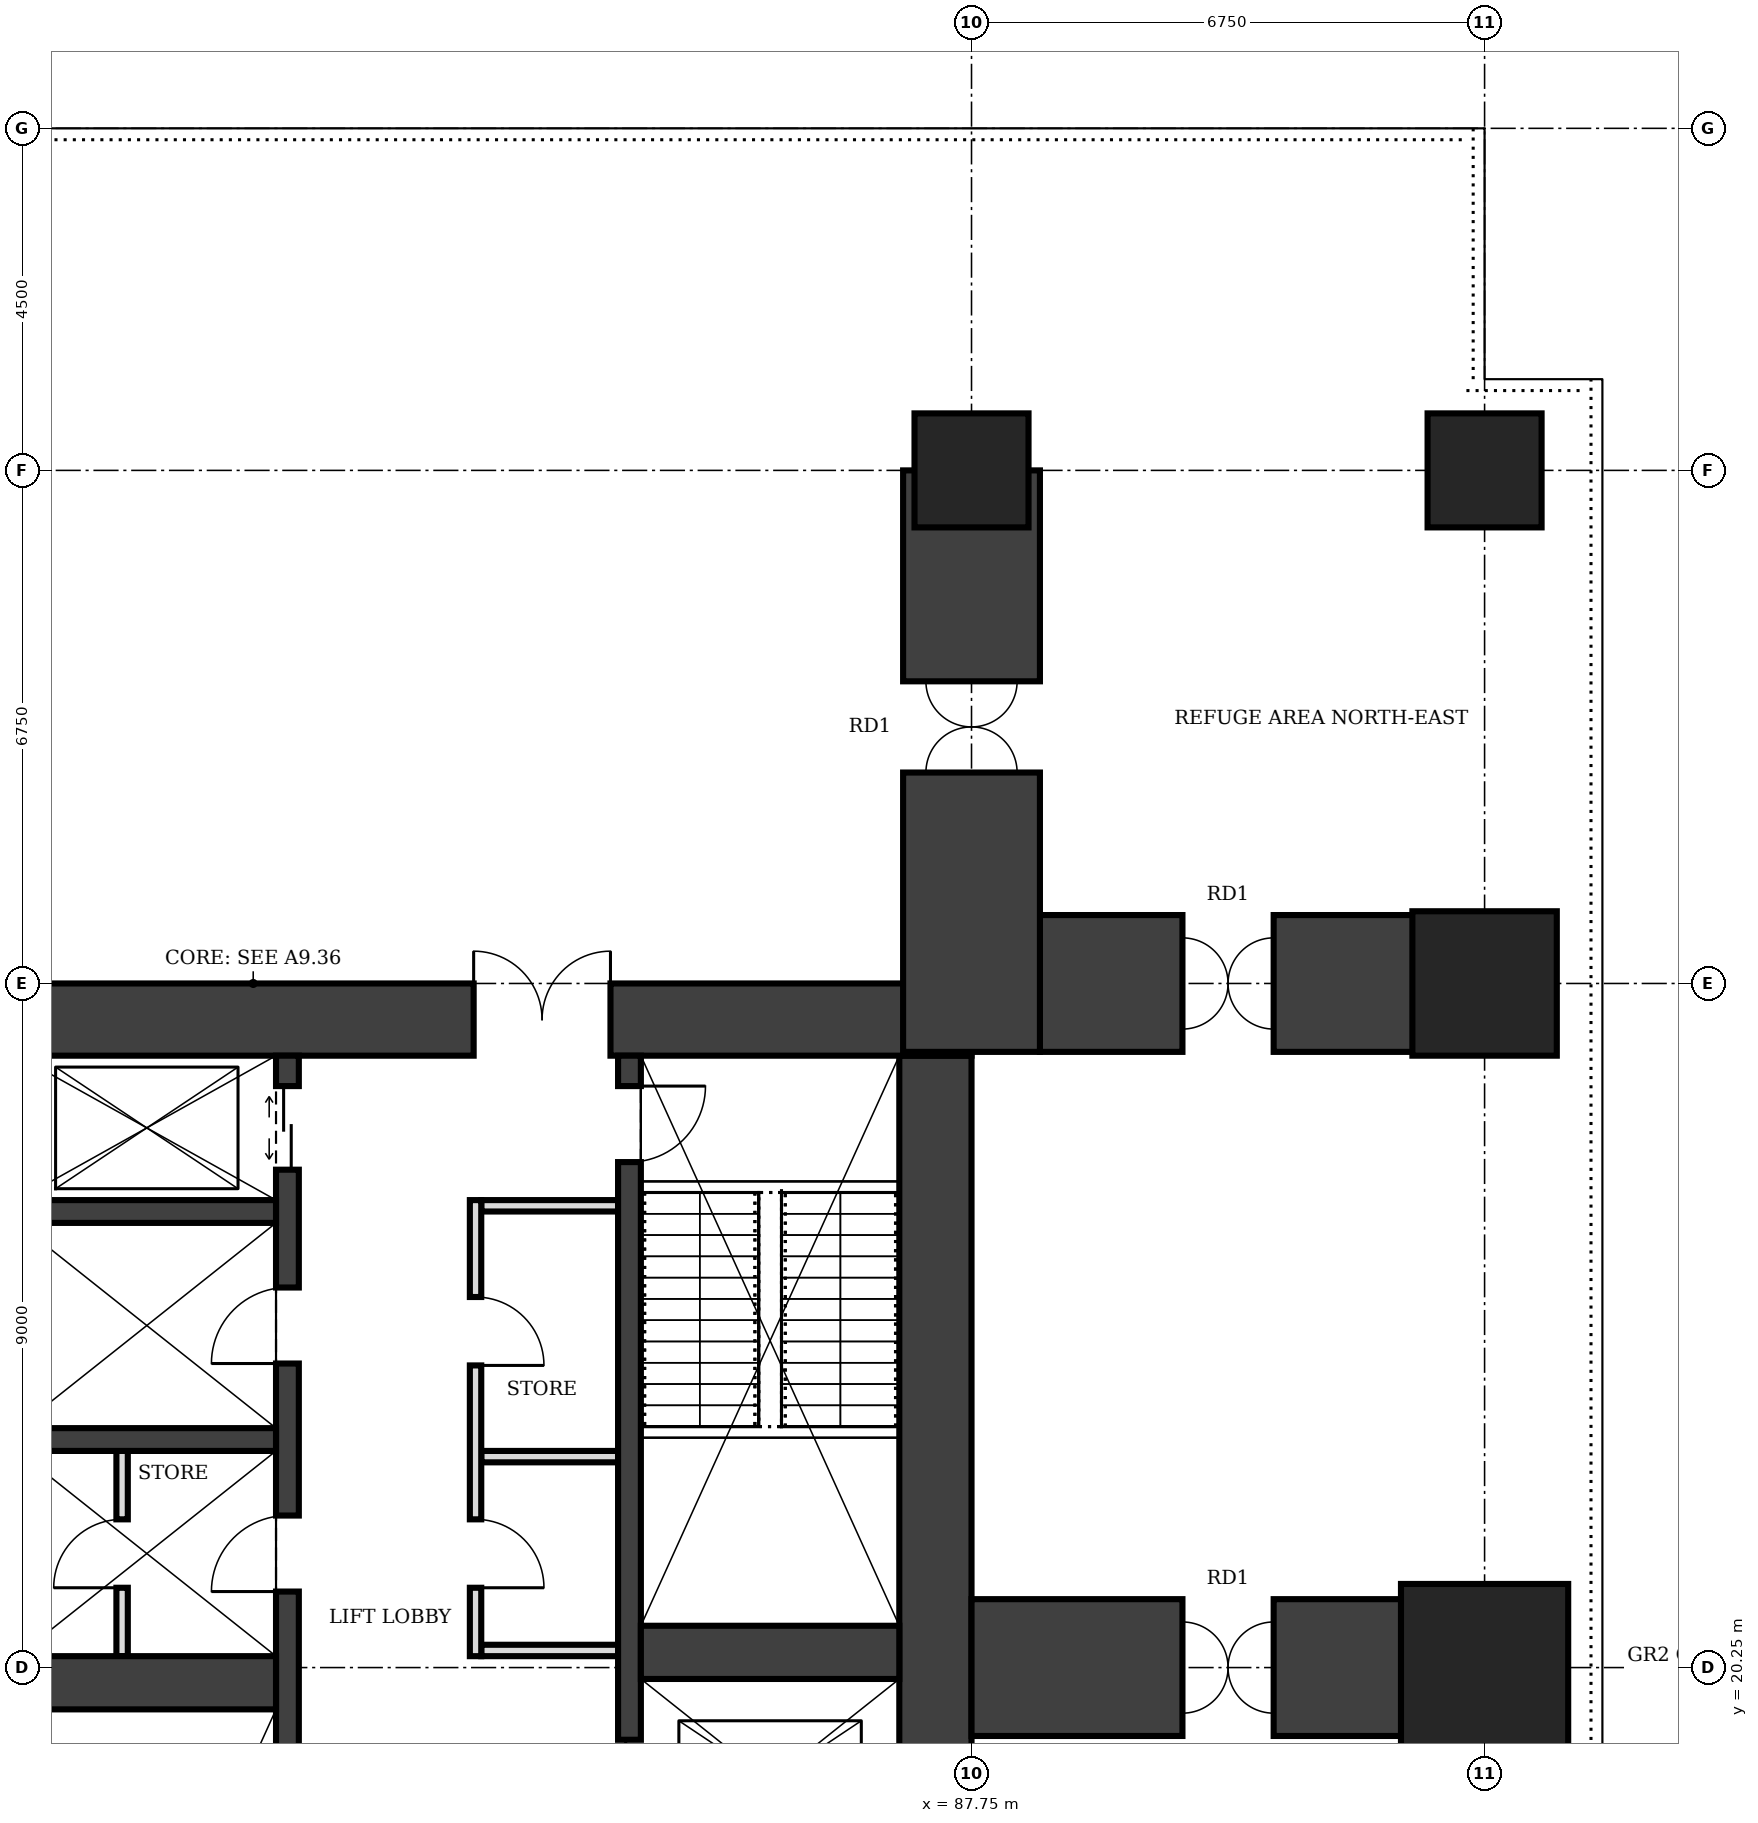
"""IFC4 building model, lengths in metres.
Left out: names, types, materials, properties, quantities, classifications, styles, units other than length and angle.
Written with IfcOpenShell. Run it as: python <this file> out.ifc"""

import sys

from ifc_helpers import new_model, si_unit, direction, frame, frame_2d, origin, origin_2d, place, context, subcontext, project, spatial, rectangle, extrude, element, fill, save


model = new_model("IFC4")
c1 = context("Model", 3, precision=1e-05, world=origin(), true_north=direction((0.0, 1.0)))
c2 = subcontext(c1, "Body", "Model", "MODEL_VIEW")
j1 = project(units=[si_unit("LENGTHUNIT", "METRE"), si_unit("PLANEANGLEUNIT", "RADIAN")], contexts=[c1])
p1 = place(None, origin())
s1 = spatial("IfcSite", under=j1, at=p1, CompositionType="ELEMENT")
p2 = place(p1, origin())
s2 = spatial("IfcBuilding", under=s1, at=p2, CompositionType="ELEMENT")
p3 = place(p2, frame((0.0, 0.0, 169.0)))
s3 = spatial("IfcBuildingStorey", under=s2, at=p3, CompositionType="ELEMENT", Elevation=169.0)
p4 = place(p3, frame((87.275, 12.2, 0.0), z_axis=(0.0, 0.0, 1.0), x_axis=(0.0, 1.0, 0.0)))
e1 = element("IfcWall", 1, at=p4, inside=s3, PredefinedType="SHEAR", context=c2, shape_type="SweptSolid", body=[
    extrude(rectangle(XDim=16.1, YDim=0.95, at=frame_2d((8.05, 0.0))), origin(), (0.0, 0.0, 1.0), 8.0),
])
p5 = place(p3, frame((87.75, 28.775, 0.0), z_axis=(0.0, 0.0, 1.0), x_axis=(-1.0, 0.0, 0.0)))
e2 = element("IfcWall", 2, at=p5, inside=s3, PredefinedType="SHEAR", context=c2, shape_type="SweptSolid", body=[
    extrude(rectangle(XDim=13.5, YDim=0.95, at=frame_2d((6.75, 0.0))), origin(), (0.0, 0.0, 1.0), 8.0),
])
p6 = place(p5, frame((4.75, 0.0, 0.0)))
e3 = element("IfcOpeningElement", 3, at=p6, cuts=e2, PredefinedType="OPENING", context=c2, shape_type="SweptSolid", body=[
    extrude(rectangle(XDim=1.8, YDim=2.1, at=frame_2d((0.9, 1.05))), frame((0.0, 0.485, 0.0), z_axis=(0.0, -1.0, 0.0), x_axis=(1.0, 0.0, 0.0)), (0.0, 0.0, 1.0), 0.97),
])
p7 = place(p3, frame((78.75, 12.2, 0.0), z_axis=(0.0, 0.0, 1.0), x_axis=(0.0, 1.0, 0.0)))
e4 = element("IfcWall", 4, at=p7, inside=s3, PredefinedType="SHEAR", context=c2, shape_type="SweptSolid", body=[
    extrude(rectangle(XDim=16.1, YDim=0.3, at=frame_2d((8.05, 0.0))), origin(), (0.0, 0.0, 1.0), 8.0),
])
p8 = place(p7, frame((0.4, 0.0, 0.0)))
e5 = element("IfcOpeningElement", 5, at=p8, cuts=e4, PredefinedType="OPENING", context=c2, shape_type="SweptSolid", body=[
    extrude(rectangle(XDim=1.0, YDim=2.1, at=frame_2d((0.5, 1.05))), frame((0.0, 0.16, 0.0), z_axis=(0.0, -1.0, 0.0), x_axis=(1.0, 0.0, 0.0)), (0.0, 0.0, 1.0), 0.32),
])
p9 = place(p7, frame((14.6, 0.0, 0.0)))
e6 = element("IfcOpeningElement", 6, at=p9, cuts=e4, PredefinedType="OPENING", context=c2, shape_type="SweptSolid", body=[
    extrude(rectangle(XDim=1.1, YDim=2.1, at=frame_2d((0.55, 1.05))), frame((0.0, 0.16, 0.0), z_axis=(0.0, -1.0, 0.0), x_axis=(1.0, 0.0, 0.0)), (0.0, 0.0, 1.0), 0.32),
])
p10 = place(p7, frame((9.05, 0.0, 0.0)))
e7 = element("IfcOpeningElement", 7, at=p10, cuts=e4, PredefinedType="OPENING", context=c2, shape_type="SweptSolid", body=[
    extrude(rectangle(XDim=1.0, YDim=2.1, at=frame_2d((0.5, 1.05))), frame((0.0, 0.16, 0.0), z_axis=(0.0, -1.0, 0.0), x_axis=(1.0, 0.0, 0.0)), (0.0, 0.0, 1.0), 0.32),
])
p11 = place(p7, frame((12.05, 0.0, 0.0)))
e8 = element("IfcOpeningElement", 8, at=p11, cuts=e4, PredefinedType="OPENING", context=c2, shape_type="SweptSolid", body=[
    extrude(rectangle(XDim=1.0, YDim=2.1, at=frame_2d((0.5, 1.05))), frame((0.0, 0.16, 0.0), z_axis=(0.0, -1.0, 0.0), x_axis=(1.0, 0.0, 0.0)), (0.0, 0.0, 1.0), 0.32),
])
p12 = place(p3, frame((83.25, 12.2, 0.0), z_axis=(0.0, 0.0, 1.0), x_axis=(0.0, 1.0, 0.0)))
e9 = element("IfcWall", 9, at=p12, inside=s3, PredefinedType="SHEAR", context=c2, shape_type="SweptSolid", body=[
    extrude(rectangle(XDim=16.1, YDim=0.3, at=frame_2d((8.05, 0.0))), origin(), (0.0, 0.0, 1.0), 8.0),
])
p13 = place(p12, frame((14.7, 0.0, 0.0)))
e10 = element("IfcOpeningElement", 10, at=p13, cuts=e9, PredefinedType="OPENING", context=c2, shape_type="SweptSolid", body=[
    extrude(rectangle(XDim=1.0, YDim=2.1, at=frame_2d((0.5, 1.05))), frame((0.0, 0.16, 0.0), z_axis=(0.0, -1.0, 0.0), x_axis=(1.0, 0.0, 0.0)), (0.0, 0.0, 1.0), 0.32),
])
p14 = place(p12, frame((0.4, 0.0, 0.0)))
e11 = element("IfcOpeningElement", 11, at=p14, cuts=e9, PredefinedType="OPENING", context=c2, shape_type="SweptSolid", body=[
    extrude(rectangle(XDim=1.1, YDim=2.1, at=frame_2d((0.55, 1.05))), frame((0.0, 0.16, 0.0), z_axis=(0.0, -1.0, 0.0), x_axis=(1.0, 0.0, 0.0)), (0.0, 0.0, 1.0), 0.32),
])
p15 = place(p12, frame((3.75, 0.0, 0.0)))
e12 = element("IfcOpeningElement", 12, at=p15, cuts=e9, PredefinedType="OPENING", context=c2, shape_type="SweptSolid", body=[
    extrude(rectangle(XDim=1.1, YDim=2.1, at=frame_2d((0.55, 1.05))), frame((0.0, 0.16, 0.0), z_axis=(0.0, -1.0, 0.0), x_axis=(1.0, 0.0, 0.0)), (0.0, 0.0, 1.0), 0.32),
])
p16 = place(p12, frame((6.0, 0.0, 0.0)))
e13 = element("IfcOpeningElement", 13, at=p16, cuts=e9, PredefinedType="OPENING", context=c2, shape_type="SweptSolid", body=[
    extrude(rectangle(XDim=1.1, YDim=2.1, at=frame_2d((0.55, 1.05))), frame((0.0, 0.16, 0.0), z_axis=(0.0, -1.0, 0.0), x_axis=(1.0, 0.0, 0.0)), (0.0, 0.0, 1.0), 0.32),
])
for number, where, z_axis, x_axis in (
    (14, (75.2, 20.05, 0.0), (0.0, 0.0, 1.0), (1.0, 0.0, 0.0)),
    (15, (83.4, 20.45, 0.0), (0.0, 0.0, 1.0), (1.0, 0.0, 0.0)),
):
    element("IfcWall", number, at=place(p3, frame(where, z_axis=z_axis, x_axis=x_axis)), inside=s3, PredefinedType="SHEAR", context=c2, shape_type="SweptSolid", body=[
        extrude(rectangle(XDim=3.4, YDim=0.7, at=frame_2d((1.7, 0.0))), origin(), (0.0, 0.0, 1.0), 8.0),
    ])
for number, where, z_axis, x_axis in (
    (16, (75.2, 23.25, 0.0), (0.0, 0.0, 1.0), (1.0, 0.0, 0.0)),
    (17, (75.2, 26.25, 0.0), (0.0, 0.0, 1.0), (1.0, 0.0, 0.0)),
):
    element("IfcWall", number, at=place(p3, frame(where, z_axis=z_axis, x_axis=x_axis)), inside=s3, PredefinedType="SHEAR", context=c2, shape_type="SweptSolid", body=[
        extrude(rectangle(XDim=3.4, YDim=0.3, at=frame_2d((1.7, 0.0))), origin(), (0.0, 0.0, 1.0), 8.0),
    ])
p17 = place(p3, frame((94.5, 20.25, 0.0), z_axis=(0.0, 0.0, 1.0), x_axis=(1.0, 0.0, 0.0)))
e18 = element("IfcColumn", 18, at=p17, inside=s3, PredefinedType="COLUMN", context=c2, shape_type="SweptSolid", body=[
    extrude(rectangle(XDim=2.2, YDim=2.2, at=origin_2d()), origin(), (0.0, 0.0, 1.0), 8.0),
])
p18 = place(p3, frame((94.5, 29.25, 0.0), z_axis=(0.0, 0.0, 1.0), x_axis=(1.0, 0.0, 0.0)))
e19 = element("IfcColumn", 19, at=p18, inside=s3, PredefinedType="COLUMN", context=c2, shape_type="SweptSolid", body=[
    extrude(rectangle(XDim=1.9, YDim=1.9, at=origin_2d()), origin(), (0.0, 0.0, 1.0), 8.0),
])
for number, where, z_axis, x_axis in (
    (20, (87.75, 36.0, 0.0), (0.0, 0.0, 1.0), (1.0, 0.0, 0.0)),
    (21, (94.5, 36.0, 0.0), (0.0, 0.0, 1.0), (1.0, 0.0, 0.0)),
):
    element("IfcColumn", number, at=place(p3, frame(where, z_axis=z_axis, x_axis=x_axis)), inside=s3, PredefinedType="COLUMN", context=c2, shape_type="SweptSolid", body=[
        extrude(rectangle(XDim=1.5, YDim=1.5, at=origin_2d()), origin(), (0.0, 0.0, 1.0), 8.0),
    ])
p19 = place(p3, frame((87.75, 28.35, 0.0), z_axis=(0.0, 0.0, 1.0), x_axis=(0.0, 1.0, 0.0)))
e22 = element("IfcWall", 22, at=p19, inside=s3, PredefinedType="SHEAR", context=c2, shape_type="SweptSolid", body=[
    extrude(rectangle(XDim=7.65, YDim=1.8, at=frame_2d((3.825, 0.0))), origin(), (0.0, 0.0, 1.0), 8.0),
])
p20 = place(p19, frame((3.675, 0.0, 0.0)))
e23 = element("IfcOpeningElement", 23, at=p20, cuts=e22, PredefinedType="OPENING", context=c2, shape_type="SweptSolid", body=[
    extrude(rectangle(XDim=1.2, YDim=2.1, at=frame_2d((0.6, 1.05))), frame((0.0, 0.91, 0.0), z_axis=(0.0, -1.0, 0.0), x_axis=(1.0, 0.0, 0.0)), (0.0, 0.0, 1.0), 1.82),
])
p21 = place(p3, frame((87.75, 20.25, 0.0), z_axis=(0.0, 0.0, 1.0), x_axis=(1.0, 0.0, 0.0)))
e24 = element("IfcWall", 24, at=p21, inside=s3, PredefinedType="SHEAR", context=c2, shape_type="SweptSolid", body=[
    extrude(rectangle(XDim=6.75, YDim=1.8, at=frame_2d((3.375, 0.0))), origin(), (0.0, 0.0, 1.0), 8.0),
])
p22 = place(p21, frame((2.775, 0.0, 0.0)))
e25 = element("IfcOpeningElement", 25, at=p22, cuts=e24, PredefinedType="OPENING", context=c2, shape_type="SweptSolid", body=[
    extrude(rectangle(XDim=1.2, YDim=2.1, at=frame_2d((0.6, 1.05))), frame((0.0, 0.91, 0.0), z_axis=(0.0, -1.0, 0.0), x_axis=(1.0, 0.0, 0.0)), (0.0, 0.0, 1.0), 1.82),
])
p23 = place(p3, frame((88.65, 29.25, 0.0), z_axis=(0.0, 0.0, 1.0), x_axis=(1.0, 0.0, 0.0)))
e26 = element("IfcWall", 26, at=p23, inside=s3, PredefinedType="SHEAR", context=c2, shape_type="SweptSolid", body=[
    extrude(rectangle(XDim=5.85, YDim=1.8, at=frame_2d((2.925, 0.0))), origin(), (0.0, 0.0, 1.0), 8.0),
])
p24 = place(p23, frame((1.875, 0.0, 0.0)))
e27 = element("IfcOpeningElement", 27, at=p24, cuts=e26, PredefinedType="OPENING", context=c2, shape_type="SweptSolid", body=[
    extrude(rectangle(XDim=1.2, YDim=2.1, at=frame_2d((0.6, 1.05))), frame((0.0, 0.91, 0.0), z_axis=(0.0, -1.0, 0.0), x_axis=(1.0, 0.0, 0.0)), (0.0, 0.0, 1.0), 1.82),
])
p25 = place(p3, frame((81.225, 20.4, 0.0), z_axis=(0.0, 0.0, 1.0), x_axis=(0.0, 1.0, 0.0)))
e28 = element("IfcWall", 28, at=p25, inside=s3, PredefinedType="PARTITIONING", context=c2, shape_type="SweptSolid", body=[
    extrude(rectangle(XDim=6.0, YDim=0.15, at=frame_2d((3.0, 0.0))), origin(), (0.0, 0.0, 1.0), 7.75),
])
p26 = place(p25, frame((0.9, 0.0, 0.0)))
e29 = element("IfcOpeningElement", 29, at=p26, cuts=e28, PredefinedType="OPENING", context=c2, shape_type="SweptSolid", body=[
    extrude(rectangle(XDim=0.9, YDim=2.1, at=frame_2d((0.45, 1.05))), frame((0.0, 0.085, 0.0), z_axis=(0.0, -1.0, 0.0), x_axis=(1.0, 0.0, 0.0)), (0.0, 0.0, 1.0), 0.17),
])
p27 = place(p25, frame((3.825, 0.0, 0.0)))
e30 = element("IfcOpeningElement", 30, at=p27, cuts=e28, PredefinedType="OPENING", context=c2, shape_type="SweptSolid", body=[
    extrude(rectangle(XDim=0.9, YDim=2.1, at=frame_2d((0.45, 1.05))), frame((0.0, 0.085, 0.0), z_axis=(0.0, -1.0, 0.0), x_axis=(1.0, 0.0, 0.0)), (0.0, 0.0, 1.0), 0.17),
])
for number, where, z_axis, x_axis in (
    (31, (81.3, 20.475, 0.0), (0.0, 0.0, 1.0), (1.0, 0.0, 0.0)),
    (32, (81.3, 23.025, 0.0), (0.0, 0.0, 1.0), (1.0, 0.0, 0.0)),
    (33, (81.3, 26.325, 0.0), (0.0, 0.0, 1.0), (1.0, 0.0, 0.0)),
):
    element("IfcWall", number, at=place(p3, frame(where, z_axis=z_axis, x_axis=x_axis)), inside=s3, PredefinedType="PARTITIONING", context=c2, shape_type="SweptSolid", body=[
        extrude(rectangle(XDim=1.8, YDim=0.15, at=frame_2d((0.9, 0.0))), origin(), (0.0, 0.0, 1.0), 7.75),
    ])
p28 = place(p3, frame((76.575, 20.4, 0.0), z_axis=(0.0, 0.0, 1.0), x_axis=(0.0, 1.0, 0.0)))
e34 = element("IfcWall", 34, at=p28, inside=s3, PredefinedType="PARTITIONING", context=c2, shape_type="SweptSolid", body=[
    extrude(rectangle(XDim=2.7, YDim=0.15, at=frame_2d((1.35, 0.0))), origin(), (0.0, 0.0, 1.0), 7.75),
])
p29 = place(p28, frame((0.9, 0.0, 0.0)))
e35 = element("IfcOpeningElement", 35, at=p29, cuts=e34, PredefinedType="OPENING", context=c2, shape_type="SweptSolid", body=[
    extrude(rectangle(XDim=0.9, YDim=2.1, at=frame_2d((0.45, 1.05))), frame((0.0, 0.085, 0.0), z_axis=(0.0, -1.0, 0.0), x_axis=(1.0, 0.0, 0.0)), (0.0, 0.0, 1.0), 0.17),
])
p30 = place(p6, frame((1.8, 0.0, 0.0), z_axis=(0.0, 0.0, 1.0), x_axis=(-1.0, 0.0, 0.0)))
e36 = element("IfcDoor", 36, at=p30, inside=s3, OperationType="DOUBLE_DOOR_SINGLE_SWING", PredefinedType="DOOR", context=c2, shape_type="SweptSolid", body=[
    extrude(rectangle(XDim=1.8, YDim=2.1, at=frame_2d((0.9, 1.05))), frame((0.0, 0.025, 0.0), z_axis=(0.0, -1.0, 0.0), x_axis=(1.0, 0.0, 0.0)), (0.0, 0.0, 1.0), 0.05),
])
fill(e3, e36)
p31 = place(p13, frame((1.0, 0.0, 0.0), z_axis=(0.0, 0.0, 1.0), x_axis=(-1.0, 0.0, 0.0)))
e37 = element("IfcDoor", 37, at=p31, inside=s3, OperationType="SINGLE_SWING_LEFT", PredefinedType="DOOR", context=c2, shape_type="SweptSolid", body=[
    extrude(rectangle(XDim=1.0, YDim=2.1, at=frame_2d((0.5, 1.05))), frame((0.0, 0.025, 0.0), z_axis=(0.0, -1.0, 0.0), x_axis=(1.0, 0.0, 0.0)), (0.0, 0.0, 1.0), 0.05),
])
fill(e10, e37)
p32 = place(p9, origin())
e38 = element("IfcDoor", 38, at=p32, inside=s3, OperationType="DOUBLE_DOOR_SLIDING", PredefinedType="DOOR", context=c2, shape_type="SweptSolid", body=[
    extrude(rectangle(XDim=1.1, YDim=2.1, at=frame_2d((0.55, 1.05))), frame((0.0, 0.025, 0.0), z_axis=(0.0, -1.0, 0.0), x_axis=(1.0, 0.0, 0.0)), (0.0, 0.0, 1.0), 0.05),
])
fill(e6, e38)
p33 = place(p16, origin())
e39 = element("IfcDoor", 39, at=p33, inside=s3, OperationType="DOUBLE_DOOR_SLIDING", PredefinedType="DOOR", context=c2, shape_type="SweptSolid", body=[
    extrude(rectangle(XDim=1.1, YDim=2.1, at=frame_2d((0.55, 1.05))), frame((0.0, 0.025, 0.0), z_axis=(0.0, -1.0, 0.0), x_axis=(1.0, 0.0, 0.0)), (0.0, 0.0, 1.0), 0.05),
])
fill(e13, e39)
p34 = place(p26, frame((0.9, 0.0, 0.0), z_axis=(0.0, 0.0, 1.0), x_axis=(-1.0, 0.0, 0.0)))
e40 = element("IfcDoor", 40, at=p34, inside=s3, OperationType="SINGLE_SWING_RIGHT", PredefinedType="DOOR", context=c2, shape_type="SweptSolid", body=[
    extrude(rectangle(XDim=0.9, YDim=2.1, at=frame_2d((0.45, 1.05))), frame((0.0, 0.025, 0.0), z_axis=(0.0, -1.0, 0.0), x_axis=(1.0, 0.0, 0.0)), (0.0, 0.0, 1.0), 0.05),
])
fill(e29, e40)
p35 = place(p27, frame((0.9, 0.0, 0.0), z_axis=(0.0, 0.0, 1.0), x_axis=(-1.0, 0.0, 0.0)))
e41 = element("IfcDoor", 41, at=p35, inside=s3, OperationType="SINGLE_SWING_RIGHT", PredefinedType="DOOR", context=c2, shape_type="SweptSolid", body=[
    extrude(rectangle(XDim=0.9, YDim=2.1, at=frame_2d((0.45, 1.05))), frame((0.0, 0.025, 0.0), z_axis=(0.0, -1.0, 0.0), x_axis=(1.0, 0.0, 0.0)), (0.0, 0.0, 1.0), 0.05),
])
fill(e30, e41)
p36 = place(p10, origin())
e42 = element("IfcDoor", 42, at=p36, inside=s3, OperationType="SINGLE_SWING_LEFT", PredefinedType="DOOR", context=c2, shape_type="SweptSolid", body=[
    extrude(rectangle(XDim=1.0, YDim=2.1, at=frame_2d((0.5, 1.05))), frame((0.0, 0.025, 0.0), z_axis=(0.0, -1.0, 0.0), x_axis=(1.0, 0.0, 0.0)), (0.0, 0.0, 1.0), 0.05),
])
fill(e7, e42)
p37 = place(p29, origin())
e43 = element("IfcDoor", 43, at=p37, inside=s3, OperationType="SINGLE_SWING_LEFT", PredefinedType="DOOR", context=c2, shape_type="SweptSolid", body=[
    extrude(rectangle(XDim=0.9, YDim=2.1, at=frame_2d((0.45, 1.05))), frame((0.0, 0.025, 0.0), z_axis=(0.0, -1.0, 0.0), x_axis=(1.0, 0.0, 0.0)), (0.0, 0.0, 1.0), 0.05),
])
fill(e35, e43)
p38 = place(p11, origin())
e44 = element("IfcDoor", 44, at=p38, inside=s3, OperationType="SINGLE_SWING_LEFT", PredefinedType="DOOR", context=c2, shape_type="SweptSolid", body=[
    extrude(rectangle(XDim=1.0, YDim=2.1, at=frame_2d((0.5, 1.05))), frame((0.0, 0.025, 0.0), z_axis=(0.0, -1.0, 0.0), x_axis=(1.0, 0.0, 0.0)), (0.0, 0.0, 1.0), 0.05),
])
fill(e8, e44)
p39 = place(p20, origin())
e45 = element("IfcDoor", 45, at=p39, inside=s3, OperationType="DOUBLE_DOOR_DOUBLE_SWING", PredefinedType="DOOR", context=c2, shape_type="SweptSolid", body=[
    extrude(rectangle(XDim=1.2, YDim=2.1, at=frame_2d((0.6, 1.05))), frame((0.0, 0.025, 0.0), z_axis=(0.0, -1.0, 0.0), x_axis=(1.0, 0.0, 0.0)), (0.0, 0.0, 1.0), 0.05),
])
fill(e23, e45)
p40 = place(p22, origin())
e46 = element("IfcDoor", 46, at=p40, inside=s3, OperationType="DOUBLE_DOOR_DOUBLE_SWING", PredefinedType="DOOR", context=c2, shape_type="SweptSolid", body=[
    extrude(rectangle(XDim=1.2, YDim=2.1, at=frame_2d((0.6, 1.05))), frame((0.0, 0.025, 0.0), z_axis=(0.0, -1.0, 0.0), x_axis=(1.0, 0.0, 0.0)), (0.0, 0.0, 1.0), 0.05),
])
fill(e25, e46)
p41 = place(p24, origin())
e47 = element("IfcDoor", 47, at=p41, inside=s3, OperationType="DOUBLE_DOOR_DOUBLE_SWING", PredefinedType="DOOR", context=c2, shape_type="SweptSolid", body=[
    extrude(rectangle(XDim=1.2, YDim=2.1, at=frame_2d((0.6, 1.05))), frame((0.0, 0.025, 0.0), z_axis=(0.0, -1.0, 0.0), x_axis=(1.0, 0.0, 0.0)), (0.0, 0.0, 1.0), 0.05),
])
fill(e27, e47)
save(model, sys.argv[1])
